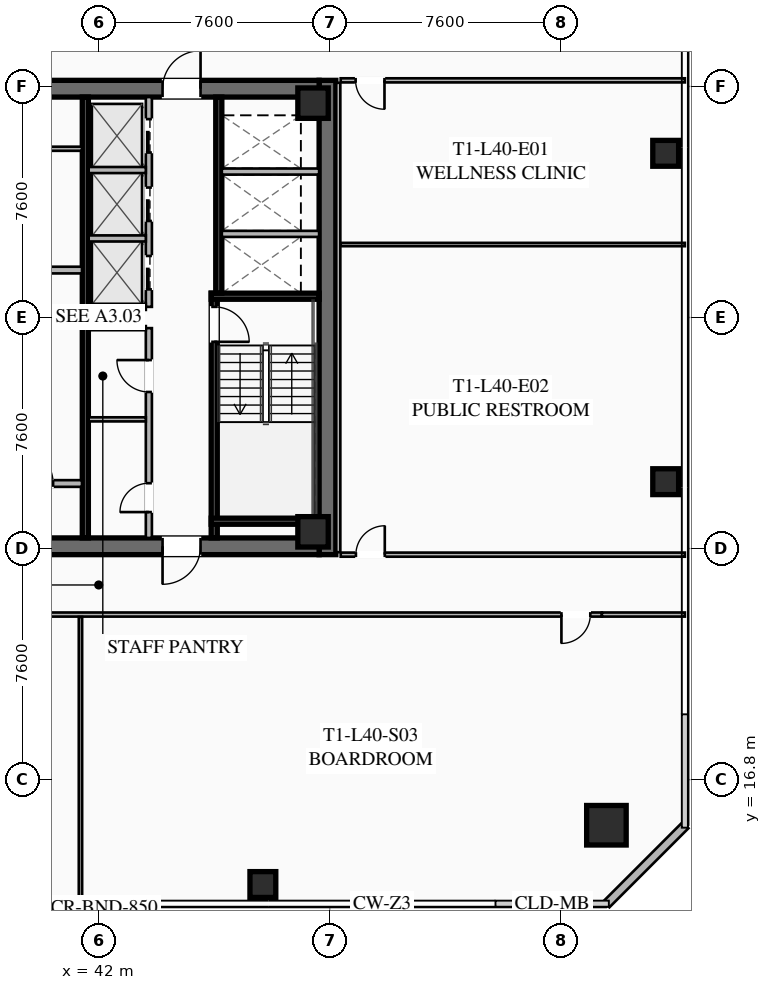
"""IFC4 building model, lengths in metres.
Left out: names, types, materials, properties, quantities, classifications, styles, units other than length and angle.
Written with IfcOpenShell. Run it as: python <this file> out.ifc"""

import sys

from ifc_helpers import new_model, si_unit, direction, frame, frame_2d, origin, origin_2d, place, context, subcontext, project, spatial, rectangle, hollow_rectangle, extrude, element, fill, save


model = new_model("IFC4")
c1 = context("Model", 3, precision=1e-05, world=origin(), true_north=direction((0.0, 1.0)))
c2 = subcontext(c1, "Body", "Model", "MODEL_VIEW")
j1 = project(units=[si_unit("LENGTHUNIT", "METRE"), si_unit("PLANEANGLEUNIT", "RADIAN")], contexts=[c1])
p1 = place(None, origin())
s1 = spatial("IfcSite", under=j1, at=p1, CompositionType="ELEMENT")
p2 = place(p1, origin())
s2 = spatial("IfcBuilding", under=s1, at=p2, CompositionType="ELEMENT")
p3 = place(p2, frame((0.0, 0.0, 149.9)))
s3 = spatial("IfcBuildingStorey", under=s2, at=p3, CompositionType="ELEMENT", Elevation=149.9)
p4 = place(p3, frame((49.525, 39.8, 0.0), z_axis=(0.0, 0.0, 1.0), x_axis=(0.0, -1.0, 0.0)))
e1 = element("IfcWall", 1, at=p4, inside=s3, PredefinedType="SHEAR", context=c2, shape_type="SweptSolid", body=[
    extrude(rectangle(XDim=15.6, YDim=0.55, at=frame_2d((7.8, 0.0))), origin(), (0.0, 0.0, 1.0), 3.55),
])
p5 = place(p3, frame((49.25, 24.475, 0.0), z_axis=(0.0, 0.0, 1.0), x_axis=(-1.0, 0.0, 0.0)))
e2 = element("IfcWall", 2, at=p5, inside=s3, PredefinedType="SHEAR", context=c2, shape_type="SweptSolid", body=[
    extrude(rectangle(XDim=14.5, YDim=0.55, at=frame_2d((7.25, 0.0))), origin(), (0.0, 0.0, 1.0), 3.55),
])
p6 = place(p5, frame((8.95, 0.0, 0.0)))
e3 = element("IfcOpeningElement", 3, at=p6, cuts=e2, PredefinedType="OPENING", context=c2, shape_type="SweptSolid", body=[
    extrude(rectangle(XDim=1.25, YDim=2.25, at=frame_2d((0.625, 1.125))), frame((0.0, 0.285, 0.0), z_axis=(0.0, -1.0, 0.0), x_axis=(1.0, 0.0, 0.0)), (0.0, 0.0, 1.0), 0.57),
])
p7 = place(p5, frame((3.9, 0.0, 0.0)))
e4 = element("IfcOpeningElement", 4, at=p7, cuts=e2, PredefinedType="OPENING", context=c2, shape_type="SweptSolid", body=[
    extrude(rectangle(XDim=1.25, YDim=2.25, at=frame_2d((0.625, 1.125))), frame((0.0, 0.285, 0.0), z_axis=(0.0, -1.0, 0.0), x_axis=(1.0, 0.0, 0.0)), (0.0, 0.0, 1.0), 0.57),
])
p8 = place(p3, frame((34.75, 39.525, 0.0), z_axis=(0.0, 0.0, 1.0), x_axis=(1.0, 0.0, 0.0)))
e5 = element("IfcWall", 5, at=p8, inside=s3, PredefinedType="SHEAR", context=c2, shape_type="SweptSolid", body=[
    extrude(rectangle(XDim=14.5, YDim=0.55, at=frame_2d((7.25, 0.0))), origin(), (0.0, 0.0, 1.0), 3.55),
])
p9 = place(p8, frame((4.3, 0.0, 0.0)))
e6 = element("IfcOpeningElement", 6, at=p9, cuts=e5, PredefinedType="OPENING", context=c2, shape_type="SweptSolid", body=[
    extrude(rectangle(XDim=1.25, YDim=2.25, at=frame_2d((0.625, 1.125))), frame((0.0, 0.285, 0.0), z_axis=(0.0, -1.0, 0.0), x_axis=(1.0, 0.0, 0.0)), (0.0, 0.0, 1.0), 0.57),
])
p10 = place(p8, frame((9.35, 0.0, 0.0)))
e7 = element("IfcOpeningElement", 7, at=p10, cuts=e5, PredefinedType="OPENING", context=c2, shape_type="SweptSolid", body=[
    extrude(rectangle(XDim=1.25, YDim=2.25, at=frame_2d((0.625, 1.125))), frame((0.0, 0.285, 0.0), z_axis=(0.0, -1.0, 0.0), x_axis=(1.0, 0.0, 0.0)), (0.0, 0.0, 1.0), 0.57),
])
for number, where, z_axis, x_axis in (
    (8, (49.05, 24.95, 0.0), (0.0, 0.0, 1.0), (1.0, 0.0, 0.0)),
    (9, (49.05, 39.05, 0.0), (0.0, 0.0, 1.0), (1.0, 0.0, 0.0)),
):
    element("IfcColumn", number, at=place(p3, frame(where, z_axis=z_axis, x_axis=x_axis)), inside=s3, PredefinedType="COLUMN", context=c2, shape_type="SweptSolid", body=[
        extrude(hollow_rectangle(XDim=1.0, YDim=1.0, WallThickness=0.04, at=origin_2d()), origin(), (0.0, 0.0, 1.0), 3.37),
    ])
p11 = place(p3, frame((58.7, 15.3, 0.0), z_axis=(0.0, 0.0, 1.0), x_axis=(1.0, 0.0, 0.0)))
e10 = element("IfcColumn", 10, at=p11, inside=s3, PredefinedType="COLUMN", context=c2, shape_type="SweptSolid", body=[
    extrude(hollow_rectangle(XDim=1.3, YDim=1.3, WallThickness=0.05, at=origin_2d()), origin(), (0.0, 0.0, 1.0), 3.37),
])
for number, where, z_axis, x_axis in (
    (11, (47.4, 13.35, 0.0), (0.0, 0.0, 1.0), (1.0, 0.0, 0.0)),
    (12, (60.65, 26.6, 0.0), (0.0, 0.0, 1.0), (1.0, 0.0, 0.0)),
    (13, (60.65, 37.4, 0.0), (0.0, 0.0, 1.0), (1.0, 0.0, 0.0)),
):
    element("IfcColumn", number, at=place(p3, frame(where, z_axis=z_axis, x_axis=x_axis)), inside=s3, PredefinedType="COLUMN", context=c2, shape_type="SweptSolid", body=[
        extrude(hollow_rectangle(XDim=0.85, YDim=0.85, WallThickness=0.035, at=origin_2d()), origin(), (0.0, 0.0, 1.0), 3.37),
    ])
p12 = place(p3, frame((61.3, 15.3, 0.0), z_axis=(0.0, 0.0, 1.0), x_axis=(-0.707106781187, -0.707106781187, 0.0)))
e14 = element("IfcWall", 14, at=p12, inside=s3, PredefinedType="SOLIDWALL", context=c2, shape_type="SweptSolid", body=[
    extrude(rectangle(XDim=3.677, YDim=0.28, at=frame_2d((1.838, 0.0))), origin(), (0.0, 0.0, 1.0), 3.37),
])
p13 = place(p3, frame((45.8, 32.8, 0.0), z_axis=(0.0, 0.0, 1.0), x_axis=(0.0, -1.0, 0.0)))
e15 = element("IfcWall", 15, at=p13, inside=s3, PredefinedType="SHEAR", context=c2, shape_type="SweptSolid", body=[
    extrude(rectangle(XDim=8.05, YDim=0.2, at=frame_2d((4.025, 0.0))), origin(), (0.0, 0.0, 1.0), 3.37),
])
p14 = place(p13, frame((0.45, 0.0, 0.0)))
e16 = element("IfcOpeningElement", 16, at=p14, cuts=e15, PredefinedType="OPENING", context=c2, shape_type="SweptSolid", body=[
    extrude(rectangle(XDim=1.15, YDim=2.2, at=frame_2d((0.575, 1.1))), frame((0.0, 0.11, 0.0), z_axis=(0.0, -1.0, 0.0), x_axis=(1.0, 0.0, 0.0)), (0.0, 0.0, 1.0), 0.22),
])
for number, where, z_axis, x_axis in (
    (17, (45.7, 32.7, 0.0), (0.0, 0.0, 1.0), (1.0, 0.0, 0.0)),
    (18, (45.7, 25.3, 0.0), (0.0, 0.0, 1.0), (1.0, 0.0, 0.0)),
):
    element("IfcWall", number, at=place(p3, frame(where, z_axis=z_axis, x_axis=x_axis)), inside=s3, PredefinedType="SHEAR", context=c2, shape_type="SweptSolid", body=[
        extrude(rectangle(XDim=3.55, YDim=0.2, at=frame_2d((1.775, 0.0))), origin(), (0.0, 0.0, 1.0), 3.37),
    ])
p15 = place(p3, frame((41.56, 24.75, 0.0), z_axis=(0.0, 0.0, 1.0), x_axis=(0.0, 1.0, 0.0)))
e19 = element("IfcWall", 19, at=p15, inside=s3, PredefinedType="SHEAR", context=c2, shape_type="SweptSolid", body=[
    extrude(rectangle(XDim=14.5, YDim=0.2, at=frame_2d((7.25, 0.0))), origin(), (0.0, 0.0, 1.0), 3.37),
])
p16 = place(p3, frame((38.3, 33.56, 0.0), z_axis=(0.0, 0.0, 1.0), x_axis=(1.0, 0.0, 0.0)))
e20 = element("IfcWall", 20, at=p16, inside=s3, PredefinedType="SOLIDWALL", context=c2, shape_type="SweptSolid", body=[
    extrude(rectangle(XDim=3.15, YDim=0.22, at=frame_2d((1.575, 0.0))), origin(), (0.0, 0.0, 1.0), 2.723),
])
p17 = place(p3, frame((38.3, 26.54, 0.0), z_axis=(0.0, 0.0, 1.0), x_axis=(1.0, 0.0, 0.0)))
e21 = element("IfcWall", 21, at=p17, inside=s3, PredefinedType="SOLIDWALL", context=c2, shape_type="SweptSolid", body=[
    extrude(rectangle(XDim=3.15, YDim=0.22, at=frame_2d((1.575, 0.0))), origin(), (0.0, 0.0, 1.0), 2.723),
])
p18 = place(p17, frame((0.95, 0.0, 0.0)))
e22 = element("IfcOpeningElement", 22, at=p18, cuts=e21, PredefinedType="OPENING", context=c2, shape_type="SweptSolid", body=[
    extrude(rectangle(XDim=1.25, YDim=2.25, at=frame_2d((0.625, 1.125))), frame((0.0, 0.12, 0.0), z_axis=(0.0, -1.0, 0.0), x_axis=(1.0, 0.0, 0.0)), (0.0, 0.0, 1.0), 0.24),
])
p19 = place(p3, frame((45.95, 39.25, 0.0), z_axis=(0.0, 0.0, 1.0), x_axis=(0.0, -1.0, 0.0)))
e23 = element("IfcWall", 23, at=p19, inside=s3, PredefinedType="SHEAR", context=c2, shape_type="SweptSolid", body=[
    extrude(rectangle(XDim=6.45, YDim=0.2, at=frame_2d((3.225, 0.0))), origin(), (0.0, 0.0, 1.0), 3.37),
])
for number, where, z_axis, x_axis in (
    (24, (46.05, 34.75, 0.0), (0.0, 0.0, 1.0), (1.0, 0.0, 0.0)),
    (25, (46.05, 36.8, 0.0), (0.0, 0.0, 1.0), (1.0, 0.0, 0.0)),
):
    element("IfcWall", number, at=place(p3, frame(where, z_axis=z_axis, x_axis=x_axis)), inside=s3, PredefinedType="SOLIDWALL", context=c2, shape_type="SweptSolid", body=[
        extrude(rectangle(XDim=3.2, YDim=0.2, at=frame_2d((1.6, 0.0))), origin(), (0.0, 0.0, 1.0), 3.37),
    ])
p20 = place(p3, frame((38.3, 37.55, 0.0), z_axis=(0.0, 0.0, 1.0), x_axis=(1.0, 0.0, 0.0)))
e26 = element("IfcWall", 26, at=p20, inside=s3, PredefinedType="PARTITIONING", context=c2, shape_type="SweptSolid", body=[
    extrude(rectangle(XDim=3.15, YDim=0.135, at=frame_2d((1.575, 0.0))), origin(), (0.0, 0.0, 1.0), 2.723),
])
p21 = place(p20, frame((1.05, 0.0, 0.0)))
e27 = element("IfcOpeningElement", 27, at=p21, cuts=e26, PredefinedType="OPENING", context=c2, shape_type="SweptSolid", body=[
    extrude(rectangle(XDim=1.05, YDim=2.2, at=frame_2d((0.525, 1.1))), frame((0.0, 0.077, 0.0), z_axis=(0.0, -1.0, 0.0), x_axis=(1.0, 0.0, 0.0)), (0.0, 0.0, 1.0), 0.155),
])
p22 = place(p3, frame((43.65, 24.75, 0.0), z_axis=(0.0, 0.0, 1.0), x_axis=(0.0, 1.0, 0.0)))
e28 = element("IfcWall", 28, at=p22, inside=s3, PredefinedType="SOLIDWALL", context=c2, shape_type="SweptSolid", body=[
    extrude(rectangle(XDim=6.9, YDim=0.2, at=frame_2d((3.45, 0.0))), origin(), (0.0, 0.0, 1.0), 2.723),
])
p23 = place(p22, frame((0.85, 0.0, 0.0)))
e29 = element("IfcOpeningElement", 29, at=p23, cuts=e28, PredefinedType="OPENING", context=c2, shape_type="SweptSolid", body=[
    extrude(rectangle(XDim=0.95, YDim=2.05, at=frame_2d((0.475, 1.025))), frame((0.0, 0.11, 0.0), z_axis=(0.0, -1.0, 0.0), x_axis=(1.0, 0.0, 0.0)), (0.0, 0.0, 1.0), 0.22),
])
p24 = place(p22, frame((4.8, 0.0, 0.0)))
e30 = element("IfcOpeningElement", 30, at=p24, cuts=e28, PredefinedType="OPENING", context=c2, shape_type="SweptSolid", body=[
    extrude(rectangle(XDim=1.05, YDim=2.2, at=frame_2d((0.525, 1.1))), frame((0.0, 0.11, 0.0), z_axis=(0.0, -1.0, 0.0), x_axis=(1.0, 0.0, 0.0)), (0.0, 0.0, 1.0), 0.22),
])
for number, where, z_axis, x_axis in (
    (31, (41.67, 31.65, 0.0), (0.0, 0.0, 1.0), (1.0, 0.0, 0.0)),
    (32, (41.67, 28.65, 0.0), (0.0, 0.0, 1.0), (1.0, 0.0, 0.0)),
):
    element("IfcWall", number, at=place(p3, frame(where, z_axis=z_axis, x_axis=x_axis)), inside=s3, PredefinedType="PARTITIONING", context=c2, shape_type="SweptSolid", body=[
        extrude(rectangle(XDim=1.88, YDim=0.135, at=frame_2d((0.94, 0.0))), origin(), (0.0, 0.0, 1.0), 2.723),
    ])
p25 = place(p3, frame((43.65, 32.35, 0.0), z_axis=(0.0, 0.0, 1.0), x_axis=(0.0, 1.0, 0.0)))
e33 = element("IfcWall", 33, at=p25, inside=s3, PredefinedType="SOLIDWALL", context=c2, shape_type="SweptSolid", body=[
    extrude(rectangle(XDim=6.9, YDim=0.2, at=frame_2d((3.45, 0.0))), origin(), (0.0, 0.0, 1.0), 3.37),
])
p26 = place(p25, frame((0.575, 0.0, 0.0)))
e34 = element("IfcOpeningElement", 34, at=p26, cuts=e33, PredefinedType="OPENING", context=c2, shape_type="SweptSolid", body=[
    extrude(rectangle(XDim=1.1, YDim=2.2, at=frame_2d((0.55, 1.1))), frame((0.0, 0.11, 0.0), z_axis=(0.0, -1.0, 0.0), x_axis=(1.0, 0.0, 0.0)), (0.0, 0.0, 1.0), 0.22),
])
p27 = place(p25, frame((2.825, 0.0, 0.0)))
e35 = element("IfcOpeningElement", 35, at=p27, cuts=e33, PredefinedType="OPENING", context=c2, shape_type="SweptSolid", body=[
    extrude(rectangle(XDim=1.1, YDim=2.2, at=frame_2d((0.55, 1.1))), frame((0.0, 0.11, 0.0), z_axis=(0.0, -1.0, 0.0), x_axis=(1.0, 0.0, 0.0)), (0.0, 0.0, 1.0), 0.22),
])
p28 = place(p25, frame((5.075, 0.0, 0.0)))
e36 = element("IfcOpeningElement", 36, at=p28, cuts=e33, PredefinedType="OPENING", context=c2, shape_type="SweptSolid", body=[
    extrude(rectangle(XDim=1.1, YDim=2.2, at=frame_2d((0.55, 1.1))), frame((0.0, 0.11, 0.0), z_axis=(0.0, -1.0, 0.0), x_axis=(1.0, 0.0, 0.0)), (0.0, 0.0, 1.0), 0.22),
])
for number, where, z_axis, x_axis in (
    (37, (41.67, 32.35, 0.0), (0.0, 0.0, 1.0), (1.0, 0.0, 0.0)),
    (38, (41.67, 34.6, 0.0), (0.0, 0.0, 1.0), (1.0, 0.0, 0.0)),
    (39, (41.67, 36.85, 0.0), (0.0, 0.0, 1.0), (1.0, 0.0, 0.0)),
):
    element("IfcWall", number, at=place(p3, frame(where, z_axis=z_axis, x_axis=x_axis)), inside=s3, PredefinedType="SOLIDWALL", context=c2, shape_type="SweptSolid", body=[
        extrude(rectangle(XDim=1.88, YDim=0.2, at=frame_2d((0.94, 0.0))), origin(), (0.0, 0.0, 1.0), 3.37),
    ])
p29 = place(p3, frame((58.55, 22.23, 0.0), z_axis=(0.0, 0.0, 1.0), x_axis=(-1.0, 0.0, 0.0)))
e40 = element("IfcWall", 40, at=p29, inside=s3, PredefinedType="PARTITIONING", context=c2, shape_type="SweptSolid", body=[
    extrude(rectangle(XDim=33.1, YDim=0.135, at=frame_2d((16.55, 0.0))), origin(), (0.0, 0.0, 1.0), 2.723),
])
p30 = place(p29, frame((31.77, 0.0, 0.0)))
e41 = element("IfcOpeningElement", 41, at=p30, cuts=e40, PredefinedType="OPENING", context=c2, shape_type="SweptSolid", body=[
    extrude(rectangle(XDim=0.95, YDim=2.05, at=frame_2d((0.475, 1.025))), frame((0.0, 0.077, 0.0), z_axis=(0.0, -1.0, 0.0), x_axis=(1.0, 0.0, 0.0)), (0.0, 0.0, 1.0), 0.155),
])
p31 = place(p29, frame((19.814, 0.0, 0.0)))
e42 = element("IfcOpeningElement", 42, at=p31, cuts=e40, PredefinedType="OPENING", context=c2, shape_type="SweptSolid", body=[
    extrude(rectangle(XDim=0.95, YDim=2.05, at=frame_2d((0.475, 1.025))), frame((0.0, 0.077, 0.0), z_axis=(0.0, -1.0, 0.0), x_axis=(1.0, 0.0, 0.0)), (0.0, 0.0, 1.0), 0.155),
])
p32 = place(p29, frame((0.38, 0.0, 0.0)))
e43 = element("IfcOpeningElement", 43, at=p32, cuts=e40, PredefinedType="OPENING", context=c2, shape_type="SweptSolid", body=[
    extrude(rectangle(XDim=0.95, YDim=2.05, at=frame_2d((0.475, 1.025))), frame((0.0, 0.077, 0.0), z_axis=(0.0, -1.0, 0.0), x_axis=(1.0, 0.0, 0.0)), (0.0, 0.0, 1.0), 0.155),
])
p33 = place(p3, frame((58.55, 22.23, 0.0), z_axis=(0.0, 0.0, 1.0), x_axis=(1.0, 0.0, 0.0)))
e44 = element("IfcWall", 44, at=p33, inside=s3, PredefinedType="PARTITIONING", context=c2, shape_type="SweptSolid", body=[
    extrude(rectangle(XDim=2.73, YDim=0.135, at=frame_2d((1.365, 0.0))), origin(), (0.0, 0.0, 1.0), 2.723),
])
p34 = place(p3, frame((41.4, 12.72, 0.0), z_axis=(0.0, 0.0, 1.0), x_axis=(0.0, 1.0, 0.0)))
e45 = element("IfcWall", 45, at=p34, inside=s3, PredefinedType="PARTITIONING", context=c2, shape_type="SweptSolid", body=[
    extrude(rectangle(XDim=9.43, YDim=0.11, at=frame_2d((4.715, 0.0))), origin(), (0.0, 0.0, 1.0), 2.723),
])
p35 = place(p3, frame((49.88, 39.72, 0.0), z_axis=(0.0, 0.0, 1.0), x_axis=(0.0, -1.0, 0.0)))
e46 = element("IfcWall", 46, at=p35, inside=s3, PredefinedType="PARTITIONING", context=c2, shape_type="SweptSolid", body=[
    extrude(rectangle(XDim=15.44, YDim=0.135, at=frame_2d((7.72, 0.0))), origin(), (0.0, 0.0, 1.0), 2.723),
])
p36 = place(p3, frame((61.28, 39.8, 0.0), z_axis=(0.0, 0.0, 1.0), x_axis=(-1.0, 0.0, 0.0)))
e47 = element("IfcWall", 47, at=p36, inside=s3, PredefinedType="PARTITIONING", context=c2, shape_type="SweptSolid", body=[
    extrude(rectangle(XDim=11.32, YDim=0.135, at=frame_2d((5.66, 0.0))), origin(), (0.0, 0.0, 1.0), 2.723),
])
p37 = place(p36, frame((9.88, 0.0, 0.0)))
e48 = element("IfcOpeningElement", 48, at=p37, cuts=e47, PredefinedType="OPENING", context=c2, shape_type="SweptSolid", body=[
    extrude(rectangle(XDim=0.95, YDim=2.05, at=frame_2d((0.475, 1.025))), frame((0.0, 0.077, 0.0), z_axis=(0.0, -1.0, 0.0), x_axis=(1.0, 0.0, 0.0)), (0.0, 0.0, 1.0), 0.155),
])
p38 = place(p3, frame((49.96, 24.2, 0.0), z_axis=(0.0, 0.0, 1.0), x_axis=(1.0, 0.0, 0.0)))
e49 = element("IfcWall", 49, at=p38, inside=s3, PredefinedType="PARTITIONING", context=c2, shape_type="SweptSolid", body=[
    extrude(rectangle(XDim=11.32, YDim=0.135, at=frame_2d((5.66, 0.0))), origin(), (0.0, 0.0, 1.0), 2.723),
])
p39 = place(p38, frame((0.5, 0.0, 0.0)))
e50 = element("IfcOpeningElement", 50, at=p39, cuts=e49, PredefinedType="OPENING", context=c2, shape_type="SweptSolid", body=[
    extrude(rectangle(XDim=0.95, YDim=2.05, at=frame_2d((0.475, 1.025))), frame((0.0, 0.077, 0.0), z_axis=(0.0, -1.0, 0.0), x_axis=(1.0, 0.0, 0.0)), (0.0, 0.0, 1.0), 0.155),
])
p40 = place(p3, frame((49.96, 34.4, 0.0), z_axis=(0.0, 0.0, 1.0), x_axis=(1.0, 0.0, 0.0)))
e51 = element("IfcWall", 51, at=p40, inside=s3, PredefinedType="PARTITIONING", context=c2, shape_type="SweptSolid", body=[
    extrude(rectangle(XDim=11.32, YDim=0.11, at=frame_2d((5.66, 0.0))), origin(), (0.0, 0.0, 1.0), 2.723),
])
p41 = place(p10, origin())
e52 = element("IfcDoor", 52, at=p41, inside=s3, OperationType="SINGLE_SWING_RIGHT", PredefinedType="DOOR", context=c2, shape_type="SweptSolid", body=[
    extrude(rectangle(XDim=1.25, YDim=2.25, at=frame_2d((0.625, 1.125))), frame((0.0, 0.025, 0.0), z_axis=(0.0, -1.0, 0.0), x_axis=(1.0, 0.0, 0.0)), (0.0, 0.0, 1.0), 0.05),
])
fill(e7, e52)
p42 = place(p7, origin())
e53 = element("IfcDoor", 53, at=p42, inside=s3, OperationType="SINGLE_SWING_RIGHT", PredefinedType="DOOR", context=c2, shape_type="SweptSolid", body=[
    extrude(rectangle(XDim=1.25, YDim=2.25, at=frame_2d((0.625, 1.125))), frame((0.0, 0.025, 0.0), z_axis=(0.0, -1.0, 0.0), x_axis=(1.0, 0.0, 0.0)), (0.0, 0.0, 1.0), 0.05),
])
fill(e4, e53)
p43 = place(p14, origin())
e54 = element("IfcDoor", 54, at=p43, inside=s3, OperationType="SINGLE_SWING_RIGHT", PredefinedType="DOOR", context=c2, shape_type="SweptSolid", body=[
    extrude(rectangle(XDim=1.15, YDim=2.2, at=frame_2d((0.575, 1.1))), frame((0.0, 0.025, 0.0), z_axis=(0.0, -1.0, 0.0), x_axis=(1.0, 0.0, 0.0)), (0.0, 0.0, 1.0), 0.05),
])
fill(e16, e54)
p44 = place(p18, origin())
e55 = element("IfcDoor", 55, at=p44, inside=s3, OperationType="SINGLE_SWING_LEFT", PredefinedType="DOOR", context=c2, shape_type="SweptSolid", body=[
    extrude(rectangle(XDim=1.25, YDim=2.25, at=frame_2d((0.625, 1.125))), frame((0.0, 0.025, 0.0), z_axis=(0.0, -1.0, 0.0), x_axis=(1.0, 0.0, 0.0)), (0.0, 0.0, 1.0), 0.05),
])
fill(e22, e55)
p45 = place(p23, origin())
e56 = element("IfcDoor", 56, at=p45, inside=s3, OperationType="SINGLE_SWING_LEFT", PredefinedType="DOOR", context=c2, shape_type="SweptSolid", body=[
    extrude(rectangle(XDim=0.95, YDim=2.05, at=frame_2d((0.475, 1.025))), frame((0.0, 0.025, 0.0), z_axis=(0.0, -1.0, 0.0), x_axis=(1.0, 0.0, 0.0)), (0.0, 0.0, 1.0), 0.05),
])
fill(e29, e56)
p46 = place(p24, origin())
e57 = element("IfcDoor", 57, at=p46, inside=s3, OperationType="SINGLE_SWING_RIGHT", PredefinedType="DOOR", context=c2, shape_type="SweptSolid", body=[
    extrude(rectangle(XDim=1.05, YDim=2.2, at=frame_2d((0.525, 1.1))), frame((0.0, 0.025, 0.0), z_axis=(0.0, -1.0, 0.0), x_axis=(1.0, 0.0, 0.0)), (0.0, 0.0, 1.0), 0.05),
])
fill(e30, e57)
p47 = place(p32, origin())
e58 = element("IfcDoor", 58, at=p47, inside=s3, OperationType="SINGLE_SWING_RIGHT", PredefinedType="DOOR", context=c2, shape_type="SweptSolid", body=[
    extrude(rectangle(XDim=0.95, YDim=2.05, at=frame_2d((0.475, 1.025))), frame((0.0, 0.025, 0.0), z_axis=(0.0, -1.0, 0.0), x_axis=(1.0, 0.0, 0.0)), (0.0, 0.0, 1.0), 0.05),
])
fill(e43, e58)
p48 = place(p37, origin())
e59 = element("IfcDoor", 59, at=p48, inside=s3, OperationType="SINGLE_SWING_LEFT", PredefinedType="DOOR", context=c2, shape_type="SweptSolid", body=[
    extrude(rectangle(XDim=0.95, YDim=2.05, at=frame_2d((0.475, 1.025))), frame((0.0, 0.025, 0.0), z_axis=(0.0, -1.0, 0.0), x_axis=(1.0, 0.0, 0.0)), (0.0, 0.0, 1.0), 0.05),
])
fill(e48, e59)
p49 = place(p39, origin())
e60 = element("IfcDoor", 60, at=p49, inside=s3, OperationType="SINGLE_SWING_RIGHT", PredefinedType="DOOR", context=c2, shape_type="SweptSolid", body=[
    extrude(rectangle(XDim=0.95, YDim=2.05, at=frame_2d((0.475, 1.025))), frame((0.0, 0.025, 0.0), z_axis=(0.0, -1.0, 0.0), x_axis=(1.0, 0.0, 0.0)), (0.0, 0.0, 1.0), 0.05),
])
fill(e50, e60)
p50 = place(p26, origin())
e61 = element("IfcDoor", 61, at=p50, inside=s3, OperationType="SLIDING_TO_LEFT", PredefinedType="DOOR", context=c2, shape_type="SweptSolid", body=[
    extrude(rectangle(XDim=1.1, YDim=2.2, at=frame_2d((0.55, 1.1))), frame((0.0, 0.025, 0.0), z_axis=(0.0, -1.0, 0.0), x_axis=(1.0, 0.0, 0.0)), (0.0, 0.0, 1.0), 0.05),
])
fill(e34, e61)
p51 = place(p27, origin())
e62 = element("IfcDoor", 62, at=p51, inside=s3, OperationType="SLIDING_TO_LEFT", PredefinedType="DOOR", context=c2, shape_type="SweptSolid", body=[
    extrude(rectangle(XDim=1.1, YDim=2.2, at=frame_2d((0.55, 1.1))), frame((0.0, 0.025, 0.0), z_axis=(0.0, -1.0, 0.0), x_axis=(1.0, 0.0, 0.0)), (0.0, 0.0, 1.0), 0.05),
])
fill(e35, e62)
p52 = place(p28, origin())
e63 = element("IfcDoor", 63, at=p52, inside=s3, OperationType="SLIDING_TO_LEFT", PredefinedType="DOOR", context=c2, shape_type="SweptSolid", body=[
    extrude(rectangle(XDim=1.1, YDim=2.2, at=frame_2d((0.55, 1.1))), frame((0.0, 0.025, 0.0), z_axis=(0.0, -1.0, 0.0), x_axis=(1.0, 0.0, 0.0)), (0.0, 0.0, 1.0), 0.05),
])
fill(e36, e63)
save(model, sys.argv[1])
